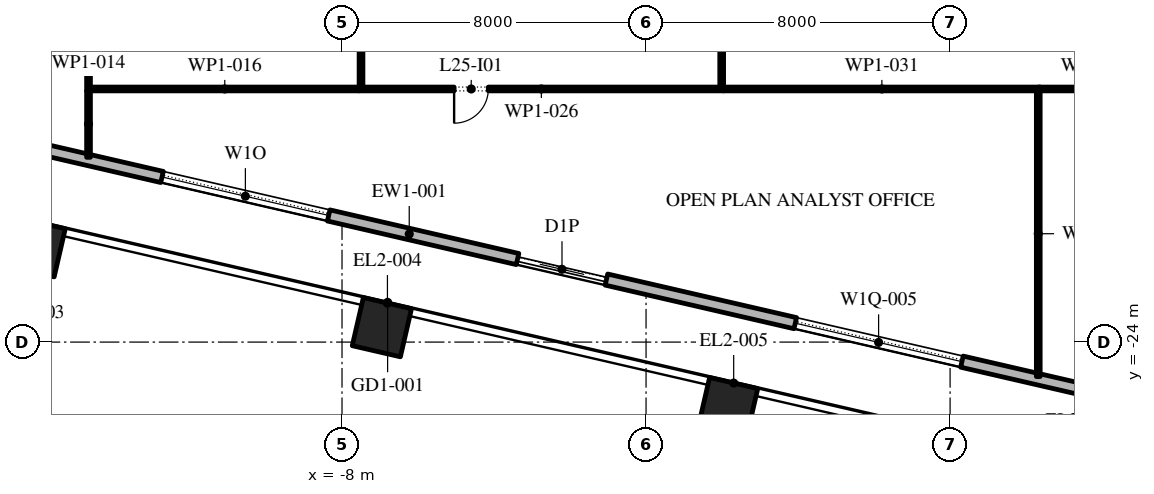
"""IFC4 building model, lengths in metres.
Left out: names, types, materials, properties, quantities, classifications, styles, units other than length and angle.
Written with IfcOpenShell. Run it as: python <this file> out.ifc"""

import sys

from ifc_helpers import new_model, si_unit, direction, frame, frame_2d, origin, origin_2d, place, context, subcontext, project, spatial, rectangle, extrude, element, fill, save


model = new_model("IFC4")
c1 = context("Model", 3, precision=1e-05, world=origin(), true_north=direction((0.0, 1.0)))
c2 = subcontext(c1, "Body", "Model", "MODEL_VIEW")
j1 = project(units=[si_unit("LENGTHUNIT", "METRE"), si_unit("PLANEANGLEUNIT", "RADIAN")], contexts=[c1])
p1 = place(None, origin())
s1 = spatial("IfcSite", under=j1, at=p1, CompositionType="ELEMENT")
p2 = place(p1, origin())
s2 = spatial("IfcBuilding", under=s1, at=p2, CompositionType="ELEMENT")
p3 = place(p2, frame((0.0, 0.0, 118.2)))
s3 = spatial("IfcBuildingStorey", under=s2, at=p3, CompositionType="ELEMENT", Elevation=118.2)
for number, where, z_axis, x_axis in (
    (1, (-16.061, -21.505, 0.0), (0.0, 0.0, 1.0), (0.974, -0.225, 0.0)),
    (2, (-6.951, -23.608, 0.0), (0.0, 0.0, 1.0), (0.974, -0.225, 0.0)),
    (3, (2.159, -25.711, 0.0), (0.0, 0.0, 1.0), (0.974, -0.225, 0.0)),
):
    element("IfcColumn", number, at=place(p3, frame(where, z_axis=z_axis, x_axis=x_axis)), inside=s3, PredefinedType="COLUMN", context=c2, shape_type="SweptSolid", body=[
        extrude(rectangle(XDim=1.3, YDim=1.3, at=origin_2d()), origin(), (0.0, 0.0, 1.0), 4.2),
    ])
p4 = place(p3, frame((-31.078, -15.421, 0.0), z_axis=(0.0, 0.0, 1.0), x_axis=(0.974370456532, -0.224949357493, 0.0)))
e4 = element("IfcWall", 4, at=p4, inside=s3, PredefinedType="STANDARD", context=c2, shape_type="SweptSolid", body=[
    extrude(rectangle(XDim=51.0, YDim=0.3, at=frame_2d((25.5, 0.0))), origin(), (0.0, 0.0, 1.0), 4.0),
])
p5 = place(p4, frame((1.875, 0.0, 0.45)))
e5 = element("IfcOpeningElement", 5, at=p5, cuts=e4, PredefinedType="OPENING", context=c2, shape_type="SweptSolid", body=[
    extrude(rectangle(XDim=4.5, YDim=2.65, at=frame_2d((2.25, 1.325))), frame((0.0, 0.16, 0.0), z_axis=(0.0, -1.0, 0.0), x_axis=(1.0, 0.0, 0.0)), (0.0, 0.0, 1.0), 0.32),
])
p6 = place(p4, frame((10.275, 0.0, 0.45)))
e6 = element("IfcOpeningElement", 6, at=p6, cuts=e4, PredefinedType="OPENING", context=c2, shape_type="SweptSolid", body=[
    extrude(rectangle(XDim=4.5, YDim=2.525, at=frame_2d((2.25, 1.262))), frame((0.0, 0.16, 0.0), z_axis=(0.0, -1.0, 0.0), x_axis=(1.0, 0.0, 0.0)), (0.0, 0.0, 1.0), 0.32),
])
p7 = place(p4, frame((18.825, 0.0, 0.45)))
e7 = element("IfcOpeningElement", 7, at=p7, cuts=e4, PredefinedType="OPENING", context=c2, shape_type="SweptSolid", body=[
    extrude(rectangle(XDim=4.5, YDim=2.5, at=frame_2d((2.25, 1.25))), frame((0.0, 0.16, 0.0), z_axis=(0.0, -1.0, 0.0), x_axis=(1.0, 0.0, 0.0)), (0.0, 0.0, 1.0), 0.32),
])
p8 = place(p4, frame((28.425, 0.0, 0.0)))
e8 = element("IfcOpeningElement", 8, at=p8, cuts=e4, PredefinedType="OPENING", context=c2, shape_type="SweptSolid", body=[
    extrude(rectangle(XDim=2.4, YDim=2.9, at=frame_2d((1.2, 1.45))), frame((0.0, 0.16, 0.0), z_axis=(0.0, -1.0, 0.0), x_axis=(1.0, 0.0, 0.0)), (0.0, 0.0, 1.0), 0.32),
])
p9 = place(p4, frame((35.925, 0.0, 0.45)))
e9 = element("IfcOpeningElement", 9, at=p9, cuts=e4, PredefinedType="OPENING", context=c2, shape_type="SweptSolid", body=[
    extrude(rectangle(XDim=4.5, YDim=2.45, at=frame_2d((2.25, 1.225))), frame((0.0, 0.16, 0.0), z_axis=(0.0, -1.0, 0.0), x_axis=(1.0, 0.0, 0.0)), (0.0, 0.0, 1.0), 0.32),
])
p10 = place(p4, frame((44.475, 0.0, 0.45)))
e10 = element("IfcOpeningElement", 10, at=p10, cuts=e4, PredefinedType="OPENING", context=c2, shape_type="SweptSolid", body=[
    extrude(rectangle(XDim=4.5, YDim=2.45, at=frame_2d((2.25, 1.225))), frame((0.0, 0.16, 0.0), z_axis=(0.0, -1.0, 0.0), x_axis=(1.0, 0.0, 0.0)), (0.0, 0.0, 1.0), 0.32),
])
p11 = place(p3, frame((-14.67, -19.138, 0.0), z_axis=(0.0, 0.0, 1.0), x_axis=(0.0, 1.0, 0.0)))
e11 = element("IfcWall", 11, at=p11, inside=s3, PredefinedType="PARTITIONING", context=c2, shape_type="SweptSolid", body=[
    extrude(rectangle(XDim=1.748, YDim=0.1, at=frame_2d((0.874, 0.0))), origin(), (0.0, 0.0, 1.0), 4.0),
])
p12 = place(p3, frame((-14.67, -17.39, 0.0), z_axis=(0.0, 0.0, 1.0), x_axis=(0.0, 1.0, 0.0)))
e12 = element("IfcWall", 12, at=p12, inside=s3, PredefinedType="PARTITIONING", context=c2, shape_type="SweptSolid", body=[
    extrude(rectangle(XDim=9.765, YDim=0.1, at=frame_2d((4.882, 0.0))), origin(), (0.0, 0.0, 1.0), 4.0),
])
p13 = place(p3, frame((-14.62, -17.34, 0.0), z_axis=(0.0, 0.0, 1.0), x_axis=(1.0, 0.0, 0.0)))
e13 = element("IfcWall", 13, at=p13, inside=s3, PredefinedType="PARTITIONING", context=c2, shape_type="SweptSolid", body=[
    extrude(rectangle(XDim=7.07, YDim=0.1, at=frame_2d((3.535, 0.0))), origin(), (0.0, 0.0, 1.0), 4.0),
])
p14 = place(p3, frame((-7.55, -17.34, 0.0), z_axis=(0.0, 0.0, 1.0), x_axis=(1.0, 0.0, 0.0)))
e14 = element("IfcWall", 14, at=p14, inside=s3, PredefinedType="PARTITIONING", context=c2, shape_type="SweptSolid", body=[
    extrude(rectangle(XDim=9.59, YDim=0.1, at=frame_2d((4.795, 0.0))), origin(), (0.0, 0.0, 1.0), 4.0),
])
p15 = place(p14, frame((2.5, 0.0, 0.0)))
e15 = element("IfcOpeningElement", 15, at=p15, cuts=e14, PredefinedType="OPENING", context=c2, shape_type="SweptSolid", body=[
    extrude(rectangle(XDim=0.9, YDim=2.1, at=frame_2d((0.45, 1.05))), frame((0.0, 0.06, 0.0), z_axis=(0.0, -1.0, 0.0), x_axis=(1.0, 0.0, 0.0)), (0.0, 0.0, 1.0), 0.12),
])
p16 = place(p3, frame((-7.5, -7.74, 0.0), z_axis=(0.0, 0.0, 1.0), x_axis=(0.0, -1.0, 0.0)))
e16 = element("IfcWall", 16, at=p16, inside=s3, PredefinedType="PARTITIONING", context=c2, shape_type="SweptSolid", body=[
    extrude(rectangle(XDim=9.55, YDim=0.1, at=frame_2d((4.775, 0.0))), origin(), (0.0, 0.0, 1.0), 4.0),
])
p17 = place(p3, frame((2.04, -17.34, 0.0), z_axis=(0.0, 0.0, 1.0), x_axis=(1.0, 0.0, 0.0)))
e17 = element("IfcWall", 17, at=p17, inside=s3, PredefinedType="PARTITIONING", context=c2, shape_type="SweptSolid", body=[
    extrude(rectangle(XDim=8.33, YDim=0.1, at=frame_2d((4.165, 0.0))), origin(), (0.0, 0.0, 1.0), 4.0),
])
p18 = place(p3, frame((1.99, -5.075, 0.0), z_axis=(0.0, 0.0, 1.0), x_axis=(0.0, -1.0, 0.0)))
e18 = element("IfcWall", 18, at=p18, inside=s3, PredefinedType="PARTITIONING", context=c2, shape_type="SweptSolid", body=[
    extrude(rectangle(XDim=12.215, YDim=0.1, at=frame_2d((6.107, 0.0))), origin(), (0.0, 0.0, 1.0), 4.0),
])
p19 = place(p3, frame((10.32, -17.39, 0.0), z_axis=(0.0, 0.0, 1.0), x_axis=(0.0, -1.0, 0.0)))
e19 = element("IfcWall", 19, at=p19, inside=s3, PredefinedType="PARTITIONING", context=c2, shape_type="SweptSolid", body=[
    extrude(rectangle(XDim=7.517, YDim=0.1, at=frame_2d((3.759, 0.0))), origin(), (0.0, 0.0, 1.0), 4.0),
])
p20 = place(p3, frame((10.32, -17.34, 0.0), z_axis=(0.0, 0.0, 1.0), x_axis=(1.0, 0.0, 0.0)))
e20 = element("IfcWall", 20, at=p20, inside=s3, PredefinedType="PARTITIONING", context=c2, shape_type="SweptSolid", body=[
    extrude(rectangle(XDim=3.13, YDim=0.1, at=frame_2d((1.565, 0.0))), origin(), (0.0, 0.0, 1.0), 4.0),
])
p21 = place(p7, origin())
e21 = element("IfcWindow", 21, at=p21, inside=s3, PartitioningType="DOUBLE_PANEL_VERTICAL", PredefinedType="WINDOW", context=c2, shape_type="SweptSolid", body=[
    extrude(rectangle(XDim=4.5, YDim=2.5, at=frame_2d((2.25, 1.25))), frame((0.0, 0.03, 0.0), z_axis=(0.0, -1.0, 0.0), x_axis=(1.0, 0.0, 0.0)), (0.0, 0.0, 1.0), 0.06),
])
fill(e7, e21)
p22 = place(p8, origin())
e22 = element("IfcDoor", 22, at=p22, inside=s3, OperationType="DOUBLE_DOOR_SLIDING", PredefinedType="DOOR", context=c2, shape_type="SweptSolid", body=[
    extrude(rectangle(XDim=2.4, YDim=2.9, at=frame_2d((1.2, 1.45))), frame((0.0, 0.025, 0.0), z_axis=(0.0, -1.0, 0.0), x_axis=(1.0, 0.0, 0.0)), (0.0, 0.0, 1.0), 0.05),
])
fill(e8, e22)
p23 = place(p9, origin())
e23 = element("IfcWindow", 23, at=p23, inside=s3, PartitioningType="DOUBLE_PANEL_VERTICAL", PredefinedType="WINDOW", context=c2, shape_type="SweptSolid", body=[
    extrude(rectangle(XDim=4.5, YDim=2.45, at=frame_2d((2.25, 1.225))), frame((0.0, 0.03, 0.0), z_axis=(0.0, -1.0, 0.0), x_axis=(1.0, 0.0, 0.0)), (0.0, 0.0, 1.0), 0.06),
])
fill(e9, e23)
p24 = place(p15, frame((0.9, 0.0, 0.0), z_axis=(0.0, 0.0, 1.0), x_axis=(-1.0, 0.0, 0.0)))
e24 = element("IfcDoor", 24, at=p24, inside=s3, OperationType="SINGLE_SWING_LEFT", PredefinedType="DOOR", context=c2, shape_type="SweptSolid", body=[
    extrude(rectangle(XDim=0.9, YDim=2.1, at=frame_2d((0.45, 1.05))), frame((0.0, 0.025, 0.0), z_axis=(0.0, -1.0, 0.0), x_axis=(1.0, 0.0, 0.0)), (0.0, 0.0, 1.0), 0.05),
])
fill(e15, e24)
save(model, sys.argv[1])
